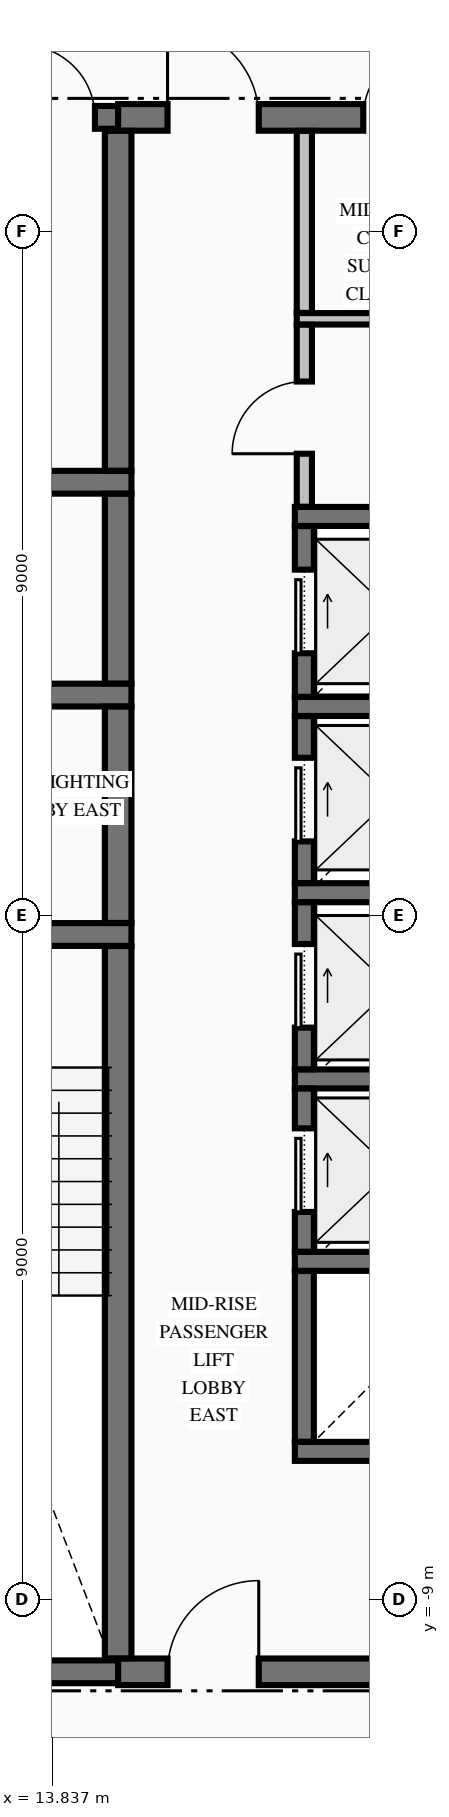
"""IFC4 building model, lengths in metres.
Left out: names, types, materials, properties, quantities, classifications, styles, units other than length and angle.
Written with IfcOpenShell. Run it as: python <this file> out.ifc"""

import sys

from ifc_helpers import new_model, si_unit, direction, frame, frame_2d, origin, place, context, subcontext, project, spatial, rectangle, extrude, element, fill, save


model = new_model("IFC4")
c1 = context("Model", 3, precision=1e-05, world=origin(), true_north=direction((0.0, 1.0)))
c2 = subcontext(c1, "Body", "Model", "MODEL_VIEW")
j1 = project(units=[si_unit("LENGTHUNIT", "METRE"), si_unit("PLANEANGLEUNIT", "RADIAN")], contexts=[c1])
p1 = place(None, origin())
s1 = spatial("IfcSite", under=j1, at=p1, CompositionType="ELEMENT")
p2 = place(p1, origin())
s2 = spatial("IfcBuilding", under=s1, at=p2, CompositionType="ELEMENT")
p3 = place(p2, frame((0.0, 0.0, 102.07)))
s3 = spatial("IfcBuildingStorey", under=s2, at=p3, CompositionType="ELEMENT", Elevation=102.07)
p4 = place(p3, frame((11.504, -9.95, 0.0), z_axis=(0.0, 0.0, 1.0), x_axis=(1.0, 0.0, 0.0)))
e1 = element("IfcWall", 1, at=p4, inside=s3, PredefinedType="SHEAR", context=c2, shape_type="SweptSolid", body=[
    extrude(rectangle(XDim=3.196, YDim=0.3, at=frame_2d((1.598, 0.0))), origin(), (0.0, 0.0, 1.0), 3.32),
])
p5 = place(p3, frame((14.7, -9.95, 0.0), z_axis=(0.0, 0.0, 1.0), x_axis=(1.0, 0.0, 0.0)))
e2 = element("IfcWall", 2, at=p5, inside=s3, PredefinedType="SHEAR", context=c2, shape_type="SweptSolid", body=[
    extrude(rectangle(XDim=4.796, YDim=0.35, at=frame_2d((2.398, 0.0))), origin(), (0.0, 0.0, 1.0), 3.32),
])
p6 = place(p5, frame((0.65, 0.0, 0.0)))
e3 = element("IfcOpeningElement", 3, at=p6, cuts=e2, PredefinedType="OPENING", context=c2, shape_type="SweptSolid", body=[
    extrude(rectangle(XDim=1.2, YDim=2.15, at=frame_2d((0.6, 1.075))), frame((0.0, 0.185, 0.0), z_axis=(0.0, -1.0, 0.0), x_axis=(1.0, 0.0, 0.0)), (0.0, 0.0, 1.0), 0.37),
])
for number, where, z_axis, x_axis in (
    (4, (17.025, -7.05, 0.0), (0.0, 0.0, 1.0), (1.0, 0.0, 0.0)),
    (5, (17.025, -4.55, 0.0), (0.0, 0.0, 1.0), (1.0, 0.0, 0.0)),
    (6, (17.025, -2.15, 0.0), (0.0, 0.0, 1.0), (1.0, 0.0, 0.0)),
):
    element("IfcWall", number, at=place(p3, frame(where, z_axis=z_axis, x_axis=x_axis)), inside=s3, PredefinedType="SOLIDWALL", context=c2, shape_type="SweptSolid", body=[
        extrude(rectangle(XDim=3.15, YDim=0.25, at=frame_2d((1.575, 0.0))), origin(), (0.0, 0.0, 1.0), 3.32),
    ])
p7 = place(p3, frame((11.504, -0.25, 0.0), z_axis=(0.0, 0.0, 1.0), x_axis=(1.0, 0.0, 0.0)))
e7 = element("IfcWall", 7, at=p7, inside=s3, PredefinedType="SHEAR", context=c2, shape_type="SweptSolid", body=[
    extrude(rectangle(XDim=3.371, YDim=0.3, at=frame_2d((1.686, 0.0))), origin(), (0.0, 0.0, 1.0), 3.32),
])
p8 = place(p7, frame((1.096, 0.0, 0.0)))
e8 = element("IfcOpeningElement", 8, at=p8, cuts=e7, PredefinedType="OPENING", context=c2, shape_type="SweptSolid", body=[
    extrude(rectangle(XDim=1.1, YDim=2.15, at=frame_2d((0.55, 1.075))), frame((0.0, 0.16, 0.0), z_axis=(0.0, -1.0, 0.0), x_axis=(1.0, 0.0, 0.0)), (0.0, 0.0, 1.0), 0.32),
])
p9 = place(p3, frame((17.025, 0.3, 0.0), z_axis=(0.0, 0.0, 1.0), x_axis=(1.0, 0.0, 0.0)))
e9 = element("IfcWall", 9, at=p9, inside=s3, PredefinedType="SOLIDWALL", context=c2, shape_type="SweptSolid", body=[
    extrude(rectangle(XDim=2.471, YDim=0.25, at=frame_2d((1.236, 0.0))), origin(), (0.0, 0.0, 1.0), 3.32),
])
p10 = place(p3, frame((17.025, 2.75, 0.0), z_axis=(0.0, 0.0, 1.0), x_axis=(1.0, 0.0, 0.0)))
e10 = element("IfcWall", 10, at=p10, inside=s3, PredefinedType="SOLIDWALL", context=c2, shape_type="SweptSolid", body=[
    extrude(rectangle(XDim=3.15, YDim=0.25, at=frame_2d((1.575, 0.0))), origin(), (0.0, 0.0, 1.0), 3.32),
])
p11 = place(p3, frame((10.85, 2.9, 0.0), z_axis=(0.0, 0.0, 1.0), x_axis=(1.0, 0.0, 0.0)))
e11 = element("IfcWall", 11, at=p11, inside=s3, PredefinedType="SHEAR", context=c2, shape_type="SweptSolid", body=[
    extrude(rectangle(XDim=4.025, YDim=0.3, at=frame_2d((2.012, 0.0))), origin(), (0.0, 0.0, 1.0), 3.32),
])
p12 = place(p11, frame((0.85, 0.0, 0.0)))
e12 = element("IfcOpeningElement", 12, at=p12, cuts=e11, PredefinedType="OPENING", context=c2, shape_type="SweptSolid", body=[
    extrude(rectangle(XDim=1.1, YDim=2.2, at=frame_2d((0.55, 1.1))), frame((0.0, 0.16, 0.0), z_axis=(0.0, -1.0, 0.0), x_axis=(1.0, 0.0, 0.0)), (0.0, 0.0, 1.0), 0.32),
])
p13 = place(p3, frame((17.025, 5.25, 0.0), z_axis=(0.0, 0.0, 1.0), x_axis=(1.0, 0.0, 0.0)))
e13 = element("IfcWall", 13, at=p13, inside=s3, PredefinedType="SOLIDWALL", context=c2, shape_type="SweptSolid", body=[
    extrude(rectangle(XDim=3.15, YDim=0.25, at=frame_2d((1.575, 0.0))), origin(), (0.0, 0.0, 1.0), 3.32),
])
p14 = place(p3, frame((10.85, 5.7, 0.0), z_axis=(0.0, 0.0, 1.0), x_axis=(1.0, 0.0, 0.0)))
e14 = element("IfcWall", 14, at=p14, inside=s3, PredefinedType="SHEAR", context=c2, shape_type="SweptSolid", body=[
    extrude(rectangle(XDim=4.025, YDim=0.3, at=frame_2d((2.012, 0.0))), origin(), (0.0, 0.0, 1.0), 3.32),
])
p15 = place(p3, frame((11.504, 10.5, 0.0), z_axis=(0.0, 0.0, 1.0), x_axis=(1.0, 0.0, 0.0)))
e15 = element("IfcWall", 15, at=p15, inside=s3, PredefinedType="SHEAR", context=c2, shape_type="SweptSolid", body=[
    extrude(rectangle(XDim=3.196, YDim=0.3, at=frame_2d((1.598, 0.0))), origin(), (0.0, 0.0, 1.0), 3.32),
])
p16 = place(p15, frame((1.941, 0.0, 0.0)))
e16 = element("IfcOpeningElement", 16, at=p16, cuts=e15, PredefinedType="OPENING", context=c2, shape_type="SweptSolid", body=[
    extrude(rectangle(XDim=0.95, YDim=2.15, at=frame_2d((0.475, 1.075))), frame((0.0, 0.16, 0.0), z_axis=(0.0, -1.0, 0.0), x_axis=(1.0, 0.0, 0.0)), (0.0, 0.0, 1.0), 0.32),
])
p17 = place(p3, frame((14.7, 10.5, 0.0), z_axis=(0.0, 0.0, 1.0), x_axis=(1.0, 0.0, 0.0)))
e17 = element("IfcWall", 17, at=p17, inside=s3, PredefinedType="SHEAR", context=c2, shape_type="SweptSolid", body=[
    extrude(rectangle(XDim=4.796, YDim=0.35, at=frame_2d((2.398, 0.0))), origin(), (0.0, 0.0, 1.0), 3.32),
])
p18 = place(p17, frame((0.65, 0.0, 0.0)))
e18 = element("IfcOpeningElement", 18, at=p18, cuts=e17, PredefinedType="OPENING", context=c2, shape_type="SweptSolid", body=[
    extrude(rectangle(XDim=1.2, YDim=2.15, at=frame_2d((0.6, 1.075))), frame((0.0, 0.185, 0.0), z_axis=(0.0, -1.0, 0.0), x_axis=(1.0, 0.0, 0.0)), (0.0, 0.0, 1.0), 0.37),
])
p19 = place(p17, frame((3.225, 0.0, 0.0)))
e19 = element("IfcOpeningElement", 19, at=p19, cuts=e17, PredefinedType="OPENING", context=c2, shape_type="SweptSolid", body=[
    extrude(rectangle(XDim=0.95, YDim=2.15, at=frame_2d((0.475, 1.075))), frame((0.0, 0.185, 0.0), z_axis=(0.0, -1.0, 0.0), x_axis=(1.0, 0.0, 0.0)), (0.0, 0.0, 1.0), 0.37),
])
p20 = place(p3, frame((17.05, 7.85, 0.0), z_axis=(0.0, 0.0, 1.0), x_axis=(1.0, 0.0, 0.0)))
e20 = element("IfcWall", 20, at=p20, inside=s3, PredefinedType="PARTITIONING", context=c2, shape_type="SweptSolid", body=[
    extrude(rectangle(XDim=2.772, YDim=0.15, at=frame_2d((1.386, 0.0))), origin(), (0.0, 0.0, 1.0), 3.32),
])
p21 = place(p3, frame((14.7, -9.773, 0.0), z_axis=(0.0, 0.0, 1.0), x_axis=(0.0, 1.0, 0.0)))
e21 = element("IfcWall", 21, at=p21, inside=s3, PredefinedType="SHEAR", context=c2, shape_type="SweptSolid", body=[
    extrude(rectangle(XDim=9.371, YDim=0.35, at=frame_2d((4.686, 0.0))), origin(), (0.0, 0.0, 1.0), 3.32),
])
p22 = place(p3, frame((14.7, -0.098, 0.0), z_axis=(0.0, 0.0, 1.0), x_axis=(0.0, 1.0, 0.0)))
e22 = element("IfcWall", 22, at=p22, inside=s3, PredefinedType="SHEAR", context=c2, shape_type="SweptSolid", body=[
    extrude(rectangle(XDim=2.846, YDim=0.35, at=frame_2d((1.423, 0.0))), origin(), (0.0, 0.0, 1.0), 3.32),
])
p23 = place(p3, frame((14.7, 3.052, 0.0), z_axis=(0.0, 0.0, 1.0), x_axis=(0.0, 1.0, 0.0)))
e23 = element("IfcWall", 23, at=p23, inside=s3, PredefinedType="SHEAR", context=c2, shape_type="SweptSolid", body=[
    extrude(rectangle(XDim=2.496, YDim=0.35, at=frame_2d((1.248, 0.0))), origin(), (0.0, 0.0, 1.0), 3.32),
])
p24 = place(p3, frame((14.7, 5.852, 0.0), z_axis=(0.0, 0.0, 1.0), x_axis=(0.0, 1.0, 0.0)))
e24 = element("IfcWall", 24, at=p24, inside=s3, PredefinedType="SHEAR", context=c2, shape_type="SweptSolid", body=[
    extrude(rectangle(XDim=4.471, YDim=0.35, at=frame_2d((2.235, 0.0))), origin(), (0.0, 0.0, 1.0), 3.32),
])
p25 = place(p3, frame((17.15, -6.923, 0.0), z_axis=(0.0, 0.0, 1.0), x_axis=(0.0, 1.0, 0.0)))
e25 = element("IfcWall", 25, at=p25, inside=s3, PredefinedType="SOLIDWALL", context=c2, shape_type="SweptSolid", body=[
    extrude(rectangle(XDim=2.246, YDim=0.25, at=frame_2d((1.123, 0.0))), origin(), (0.0, 0.0, 1.0), 3.32),
])
p26 = place(p3, frame((17.15, -4.423, 0.0), z_axis=(0.0, 0.0, 1.0), x_axis=(0.0, 1.0, 0.0)))
e26 = element("IfcWall", 26, at=p26, inside=s3, PredefinedType="SOLIDWALL", context=c2, shape_type="SweptSolid", body=[
    extrude(rectangle(XDim=2.146, YDim=0.25, at=frame_2d((1.073, 0.0))), origin(), (0.0, 0.0, 1.0), 3.32),
])
p27 = place(p26, frame((0.523, 0.0, 0.0)))
e27 = element("IfcOpeningElement", 27, at=p27, cuts=e26, PredefinedType="OPENING", context=c2, shape_type="SweptSolid", body=[
    extrude(rectangle(XDim=1.1, YDim=2.2, at=frame_2d((0.55, 1.1))), frame((0.0, 0.135, 0.0), z_axis=(0.0, -1.0, 0.0), x_axis=(1.0, 0.0, 0.0)), (0.0, 0.0, 1.0), 0.27),
])
p28 = place(p3, frame((17.15, -2.023, 0.0), z_axis=(0.0, 0.0, 1.0), x_axis=(0.0, 1.0, 0.0)))
e28 = element("IfcWall", 28, at=p28, inside=s3, PredefinedType="SOLIDWALL", context=c2, shape_type="SweptSolid", body=[
    extrude(rectangle(XDim=2.196, YDim=0.25, at=frame_2d((1.098, 0.0))), origin(), (0.0, 0.0, 1.0), 3.32),
])
p29 = place(p28, frame((0.548, 0.0, 0.0)))
e29 = element("IfcOpeningElement", 29, at=p29, cuts=e28, PredefinedType="OPENING", context=c2, shape_type="SweptSolid", body=[
    extrude(rectangle(XDim=1.1, YDim=2.2, at=frame_2d((0.55, 1.1))), frame((0.0, 0.135, 0.0), z_axis=(0.0, -1.0, 0.0), x_axis=(1.0, 0.0, 0.0)), (0.0, 0.0, 1.0), 0.27),
])
p30 = place(p3, frame((17.15, 0.427, 0.0), z_axis=(0.0, 0.0, 1.0), x_axis=(0.0, 1.0, 0.0)))
e30 = element("IfcWall", 30, at=p30, inside=s3, PredefinedType="SOLIDWALL", context=c2, shape_type="SweptSolid", body=[
    extrude(rectangle(XDim=2.196, YDim=0.25, at=frame_2d((1.098, 0.0))), origin(), (0.0, 0.0, 1.0), 3.32),
])
p31 = place(p30, frame((0.548, 0.0, 0.0)))
e31 = element("IfcOpeningElement", 31, at=p31, cuts=e30, PredefinedType="OPENING", context=c2, shape_type="SweptSolid", body=[
    extrude(rectangle(XDim=1.1, YDim=2.2, at=frame_2d((0.55, 1.1))), frame((0.0, 0.135, 0.0), z_axis=(0.0, -1.0, 0.0), x_axis=(1.0, 0.0, 0.0)), (0.0, 0.0, 1.0), 0.27),
])
p32 = place(p3, frame((17.15, 2.877, 0.0), z_axis=(0.0, 0.0, 1.0), x_axis=(0.0, 1.0, 0.0)))
e32 = element("IfcWall", 32, at=p32, inside=s3, PredefinedType="SOLIDWALL", context=c2, shape_type="SweptSolid", body=[
    extrude(rectangle(XDim=2.246, YDim=0.25, at=frame_2d((1.123, 0.0))), origin(), (0.0, 0.0, 1.0), 3.32),
])
p33 = place(p32, frame((0.573, 0.0, 0.0)))
e33 = element("IfcOpeningElement", 33, at=p33, cuts=e32, PredefinedType="OPENING", context=c2, shape_type="SweptSolid", body=[
    extrude(rectangle(XDim=1.1, YDim=2.2, at=frame_2d((0.55, 1.1))), frame((0.0, 0.135, 0.0), z_axis=(0.0, -1.0, 0.0), x_axis=(1.0, 0.0, 0.0)), (0.0, 0.0, 1.0), 0.27),
])
p34 = place(p3, frame((17.15, 5.378, 0.0), z_axis=(0.0, 0.0, 1.0), x_axis=(0.0, 1.0, 0.0)))
e34 = element("IfcWall", 34, at=p34, inside=s3, PredefinedType="PARTITIONING", context=c2, shape_type="SweptSolid", body=[
    extrude(rectangle(XDim=2.394, YDim=0.2, at=frame_2d((1.197, 0.0))), origin(), (0.0, 0.0, 1.0), 3.32),
])
p35 = place(p34, frame((0.697, 0.0, 0.0)))
e35 = element("IfcOpeningElement", 35, at=p35, cuts=e34, PredefinedType="OPENING", context=c2, shape_type="SweptSolid", body=[
    extrude(rectangle(XDim=0.95, YDim=2.15, at=frame_2d((0.475, 1.075))), frame((0.0, 0.11, 0.0), z_axis=(0.0, -1.0, 0.0), x_axis=(1.0, 0.0, 0.0)), (0.0, 0.0, 1.0), 0.22),
])
p36 = place(p3, frame((17.15, 7.928, 0.0), z_axis=(0.0, 0.0, 1.0), x_axis=(0.0, 1.0, 0.0)))
e36 = element("IfcWall", 36, at=p36, inside=s3, PredefinedType="PARTITIONING", context=c2, shape_type="SweptSolid", body=[
    extrude(rectangle(XDim=2.394, YDim=0.2, at=frame_2d((1.197, 0.0))), origin(), (0.0, 0.0, 1.0), 3.32),
])
p37 = place(p16, origin())
e37 = element("IfcDoor", 37, at=p37, inside=s3, OperationType="SINGLE_SWING_LEFT", PredefinedType="DOOR", context=c2, shape_type="SweptSolid", body=[
    extrude(rectangle(XDim=0.95, YDim=2.15, at=frame_2d((0.475, 1.075))), frame((0.0, 0.025, 0.0), z_axis=(0.0, -1.0, 0.0), x_axis=(1.0, 0.0, 0.0)), (0.0, 0.0, 1.0), 0.05),
])
fill(e16, e37)
p38 = place(p27, origin())
e38 = element("IfcDoor", 38, at=p38, inside=s3, OperationType="SLIDING_TO_RIGHT", PredefinedType="DOOR", context=c2, shape_type="SweptSolid", body=[
    extrude(rectangle(XDim=1.1, YDim=2.2, at=frame_2d((0.55, 1.1))), frame((0.0, 0.025, 0.0), z_axis=(0.0, -1.0, 0.0), x_axis=(1.0, 0.0, 0.0)), (0.0, 0.0, 1.0), 0.05),
])
fill(e27, e38)
p39 = place(p29, origin())
e39 = element("IfcDoor", 39, at=p39, inside=s3, OperationType="SLIDING_TO_RIGHT", PredefinedType="DOOR", context=c2, shape_type="SweptSolid", body=[
    extrude(rectangle(XDim=1.1, YDim=2.2, at=frame_2d((0.55, 1.1))), frame((0.0, 0.025, 0.0), z_axis=(0.0, -1.0, 0.0), x_axis=(1.0, 0.0, 0.0)), (0.0, 0.0, 1.0), 0.05),
])
fill(e29, e39)
p40 = place(p31, origin())
e40 = element("IfcDoor", 40, at=p40, inside=s3, OperationType="SLIDING_TO_RIGHT", PredefinedType="DOOR", context=c2, shape_type="SweptSolid", body=[
    extrude(rectangle(XDim=1.1, YDim=2.2, at=frame_2d((0.55, 1.1))), frame((0.0, 0.025, 0.0), z_axis=(0.0, -1.0, 0.0), x_axis=(1.0, 0.0, 0.0)), (0.0, 0.0, 1.0), 0.05),
])
fill(e31, e40)
p41 = place(p33, origin())
e41 = element("IfcDoor", 41, at=p41, inside=s3, OperationType="SLIDING_TO_RIGHT", PredefinedType="DOOR", context=c2, shape_type="SweptSolid", body=[
    extrude(rectangle(XDim=1.1, YDim=2.2, at=frame_2d((0.55, 1.1))), frame((0.0, 0.025, 0.0), z_axis=(0.0, -1.0, 0.0), x_axis=(1.0, 0.0, 0.0)), (0.0, 0.0, 1.0), 0.05),
])
fill(e33, e41)
p42 = place(p6, origin())
e42 = element("IfcDoor", 42, at=p42, inside=s3, OperationType="SINGLE_SWING_RIGHT", PredefinedType="DOOR", context=c2, shape_type="SweptSolid", body=[
    extrude(rectangle(XDim=1.2, YDim=2.15, at=frame_2d((0.6, 1.075))), frame((0.0, 0.025, 0.0), z_axis=(0.0, -1.0, 0.0), x_axis=(1.0, 0.0, 0.0)), (0.0, 0.0, 1.0), 0.05),
])
fill(e3, e42)
p43 = place(p18, origin())
e43 = element("IfcDoor", 43, at=p43, inside=s3, OperationType="SINGLE_SWING_LEFT", PredefinedType="DOOR", context=c2, shape_type="SweptSolid", body=[
    extrude(rectangle(XDim=1.2, YDim=2.15, at=frame_2d((0.6, 1.075))), frame((0.0, 0.025, 0.0), z_axis=(0.0, -1.0, 0.0), x_axis=(1.0, 0.0, 0.0)), (0.0, 0.0, 1.0), 0.05),
])
fill(e18, e43)
p44 = place(p19, origin())
e44 = element("IfcDoor", 44, at=p44, inside=s3, OperationType="SINGLE_SWING_RIGHT", PredefinedType="DOOR", context=c2, shape_type="SweptSolid", body=[
    extrude(rectangle(XDim=0.95, YDim=2.15, at=frame_2d((0.475, 1.075))), frame((0.0, 0.025, 0.0), z_axis=(0.0, -1.0, 0.0), x_axis=(1.0, 0.0, 0.0)), (0.0, 0.0, 1.0), 0.05),
])
fill(e19, e44)
p45 = place(p35, origin())
e45 = element("IfcDoor", 45, at=p45, inside=s3, OperationType="SINGLE_SWING_LEFT", PredefinedType="DOOR", context=c2, shape_type="SweptSolid", body=[
    extrude(rectangle(XDim=0.95, YDim=2.15, at=frame_2d((0.475, 1.075))), frame((0.0, 0.025, 0.0), z_axis=(0.0, -1.0, 0.0), x_axis=(1.0, 0.0, 0.0)), (0.0, 0.0, 1.0), 0.05),
])
fill(e35, e45)
save(model, sys.argv[1])
